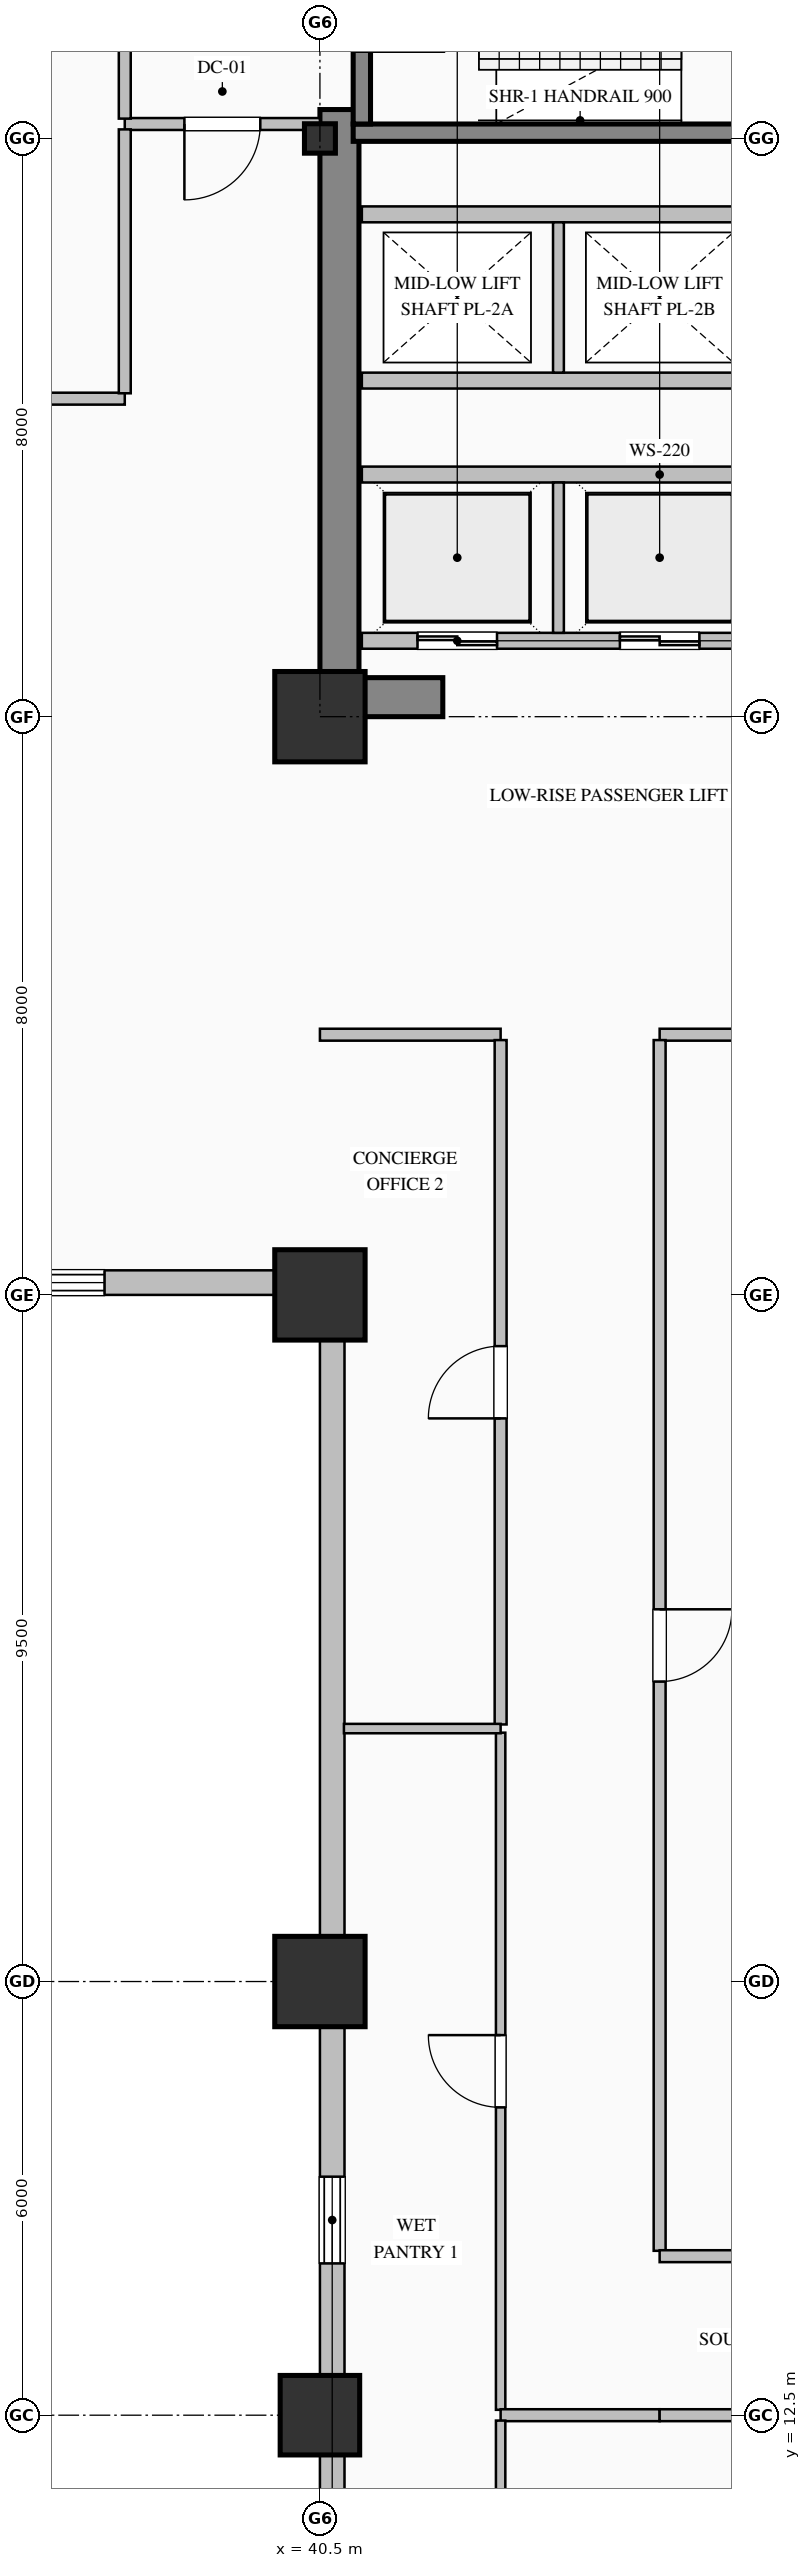
"""IFC4 building model, lengths in metres.
Left out: names, types, materials, properties, quantities, classifications, styles, units other than length and angle.
Written with IfcOpenShell. Run it as: python <this file> out.ifc"""

import sys

from ifc_helpers import new_model, si_unit, direction, frame, frame_2d, origin, origin_2d, place, context, subcontext, project, spatial, rectangle, hollow_rectangle, i_section, extrude, element, fill, save


model = new_model("IFC4")
c1 = context("Model", 3, precision=1e-05, world=origin(), true_north=direction((0.0, 1.0)))
c2 = subcontext(c1, "Body", "Model", "MODEL_VIEW")
j1 = project(units=[si_unit("LENGTHUNIT", "METRE"), si_unit("PLANEANGLEUNIT", "RADIAN")], contexts=[c1])
p1 = place(None, origin())
s1 = spatial("IfcSite", under=j1, at=p1, CompositionType="ELEMENT")
p2 = place(p1, origin())
s2 = spatial("IfcBuilding", under=s1, at=p2, CompositionType="ELEMENT")
p3 = place(p2, frame((0.0, 0.0, 72.2)))
s3 = spatial("IfcBuildingStorey", under=s2, at=p3, CompositionType="ELEMENT", Elevation=72.2)
p4 = place(p3, frame((40.77, 36.54, 0.0), z_axis=(0.0, 0.0, 1.0), x_axis=(0.0, 1.0, 0.0)))
e1 = element("IfcWall", 1, at=p4, inside=s3, PredefinedType="SHEAR", context=c2, shape_type="SweptSolid", body=[
    extrude(rectangle(XDim=7.86, YDim=0.54, at=frame_2d((3.93, 0.0))), origin(), (0.0, 0.0, 1.0), 3.75),
])
p5 = place(p3, frame((40.5, 36.27, 0.0), z_axis=(0.0, 0.0, 1.0), x_axis=(1.0, 0.0, 0.0)))
e2 = element("IfcWall", 2, at=p5, inside=s3, PredefinedType="SHEAR", context=c2, shape_type="SweptSolid", body=[
    extrude(rectangle(XDim=1.7, YDim=0.54, at=frame_2d((0.85, 0.0))), origin(), (0.0, 0.0, 1.0), 3.75),
])
p6 = place(p3, frame((40.5, 12.5, 0.0), z_axis=(0.0, 0.0, 1.0), x_axis=(1.0, 0.0, 0.0)))
e3 = element("IfcColumn", 3, at=p6, inside=s3, PredefinedType="COLUMN", context=c2, shape_type="SweptSolid", body=[
    extrude(hollow_rectangle(XDim=1.1, YDim=1.1, WallThickness=0.04, at=origin_2d()), origin(), (0.0, 0.0, 1.0), 4.0),
])
for number, where, z_axis, x_axis in (
    (4, (40.5, 18.5, 0.0), (0.0, 0.0, 1.0), (1.0, 0.0, 0.0)),
    (5, (40.5, 28.0, 0.0), (0.0, 0.0, 1.0), (1.0, 0.0, 0.0)),
    (6, (40.5, 36.0, 0.0), (0.0, 0.0, 1.0), (1.0, 0.0, 0.0)),
):
    element("IfcColumn", number, at=place(p3, frame(where, z_axis=z_axis, x_axis=x_axis)), inside=s3, PredefinedType="COLUMN", context=c2, shape_type="SweptSolid", body=[
        extrude(hollow_rectangle(XDim=1.25, YDim=1.25, WallThickness=0.045, at=origin_2d()), origin(), (0.0, 0.0, 1.0), 4.0),
    ])
p7 = place(p3, frame((40.5, 44.0, 0.0), z_axis=(0.0, 0.0, 1.0), x_axis=(1.0, 0.0, 0.0)))
e7 = element("IfcColumn", 7, at=p7, inside=s3, PredefinedType="COLUMN", context=c2, shape_type="SweptSolid", body=[
    extrude(i_section(OverallWidth=0.407, OverallDepth=0.428, WebThickness=0.02, FlangeThickness=0.035, FilletRadius=0.022, at=origin_2d()), origin(), (0.0, 0.0, 1.0), 4.0),
])
p8 = place(p3, frame((40.67, 8.0, 0.0), z_axis=(0.0, 0.0, 1.0), x_axis=(0.0, 1.0, 0.0)))
e8 = element("IfcWall", 8, at=p8, inside=s3, PredefinedType="SOLIDWALL", context=c2, shape_type="SweptSolid", body=[
    extrude(rectangle(XDim=20.34, YDim=0.34, at=frame_2d((10.17, 0.0))), origin(), (0.0, 0.0, 1.0), 3.05),
])
p9 = place(p8, frame((6.6, 0.0, 0.7)))
e9 = element("IfcOpeningElement", 9, at=p9, cuts=e8, PredefinedType="OPENING", context=c2, shape_type="SweptSolid", body=[
    extrude(rectangle(XDim=1.2, YDim=1.85, at=frame_2d((0.6, 0.925))), frame((0.0, 0.18, 0.0), z_axis=(0.0, -1.0, 0.0), x_axis=(1.0, 0.0, 0.0)), (0.0, 0.0, 1.0), 0.36),
])
p10 = place(p3, frame((40.52, 28.17, 0.0), z_axis=(0.0, 0.0, 1.0), x_axis=(-1.0, 0.0, 0.0)))
e10 = element("IfcWall", 10, at=p10, inside=s3, PredefinedType="SOLIDWALL", context=c2, shape_type="SweptSolid", body=[
    extrude(rectangle(XDim=36.52, YDim=0.34, at=frame_2d((18.26, 0.0))), origin(), (0.0, 0.0, 1.0), 3.05),
])
p11 = place(p10, frame((3.0, 0.0, 0.7)))
e11 = element("IfcOpeningElement", 11, at=p11, cuts=e10, PredefinedType="OPENING", context=c2, shape_type="SweptSolid", body=[
    extrude(rectangle(XDim=1.2, YDim=1.85, at=frame_2d((0.6, 0.925))), frame((0.0, 0.18, 0.0), z_axis=(0.0, -1.0, 0.0), x_axis=(1.0, 0.0, 0.0)), (0.0, 0.0, 1.0), 0.36),
])
p12 = place(p10, frame((10.2, 0.0, 0.7)))
e12 = element("IfcOpeningElement", 12, at=p12, cuts=e10, PredefinedType="OPENING", context=c2, shape_type="SweptSolid", body=[
    extrude(rectangle(XDim=1.2, YDim=1.85, at=frame_2d((0.6, 0.925))), frame((0.0, 0.18, 0.0), z_axis=(0.0, -1.0, 0.0), x_axis=(1.0, 0.0, 0.0)), (0.0, 0.0, 1.0), 0.36),
])
p13 = place(p10, frame((13.8, 0.0, 0.7)))
e13 = element("IfcOpeningElement", 13, at=p13, cuts=e10, PredefinedType="OPENING", context=c2, shape_type="SweptSolid", body=[
    extrude(rectangle(XDim=1.2, YDim=1.85, at=frame_2d((0.6, 0.925))), frame((0.0, 0.18, 0.0), z_axis=(0.0, -1.0, 0.0), x_axis=(1.0, 0.0, 0.0)), (0.0, 0.0, 1.0), 0.36),
])
p14 = place(p10, frame((17.4, 0.0, 0.7)))
e14 = element("IfcOpeningElement", 14, at=p14, cuts=e10, PredefinedType="OPENING", context=c2, shape_type="SweptSolid", body=[
    extrude(rectangle(XDim=1.2, YDim=1.85, at=frame_2d((0.6, 0.925))), frame((0.0, 0.18, 0.0), z_axis=(0.0, -1.0, 0.0), x_axis=(1.0, 0.0, 0.0)), (0.0, 0.0, 1.0), 0.36),
])
p15 = place(p10, frame((21.0, 0.0, 0.7)))
e15 = element("IfcOpeningElement", 15, at=p15, cuts=e10, PredefinedType="OPENING", context=c2, shape_type="SweptSolid", body=[
    extrude(rectangle(XDim=1.2, YDim=1.85, at=frame_2d((0.6, 0.925))), frame((0.0, 0.18, 0.0), z_axis=(0.0, -1.0, 0.0), x_axis=(1.0, 0.0, 0.0)), (0.0, 0.0, 1.0), 0.36),
])
p16 = place(p10, frame((28.2, 0.0, 0.7)))
e16 = element("IfcOpeningElement", 16, at=p16, cuts=e10, PredefinedType="OPENING", context=c2, shape_type="SweptSolid", body=[
    extrude(rectangle(XDim=1.2, YDim=1.85, at=frame_2d((0.6, 0.925))), frame((0.0, 0.18, 0.0), z_axis=(0.0, -1.0, 0.0), x_axis=(1.0, 0.0, 0.0)), (0.0, 0.0, 1.0), 0.36),
])
p17 = place(p3, frame((49.04, 44.08, 0.0), z_axis=(0.0, 0.0, 1.0), x_axis=(-1.0, 0.0, 0.0)))
e17 = element("IfcWall", 17, at=p17, inside=s3, PredefinedType="SOLIDWALL", context=c2, shape_type="SweptSolid", body=[
    extrude(rectangle(XDim=8.08, YDim=0.24, at=frame_2d((4.04, 0.0))), origin(), (0.0, 0.0, 1.0), 4.0),
])
p18 = place(p3, frame((41.08, 47.35, 0.0), z_axis=(0.0, 0.0, 1.0), x_axis=(0.0, -1.0, 0.0)))
e18 = element("IfcWall", 18, at=p18, inside=s3, PredefinedType="SOLIDWALL", context=c2, shape_type="SweptSolid", body=[
    extrude(rectangle(XDim=3.15, YDim=0.24, at=frame_2d((1.575, 0.0))), origin(), (0.0, 0.0, 1.0), 4.0),
])
p19 = place(p18, frame((1.0, 0.0, 0.0)))
e19 = element("IfcOpeningElement", 19, at=p19, cuts=e18, PredefinedType="OPENING", context=c2, shape_type="SweptSolid", body=[
    extrude(rectangle(XDim=1.15, YDim=2.2, at=frame_2d((0.575, 1.1))), frame((0.0, 0.13, 0.0), z_axis=(0.0, -1.0, 0.0), x_axis=(1.0, 0.0, 0.0)), (0.0, 0.0, 1.0), 0.26),
])
p20 = place(p3, frame((49.32, 37.05, 0.0), z_axis=(0.0, 0.0, 1.0), x_axis=(-1.0, 0.0, 0.0)))
e20 = element("IfcWall", 20, at=p20, inside=s3, PredefinedType="PARTITIONING", context=c2, shape_type="SweptSolid", body=[
    extrude(rectangle(XDim=8.24, YDim=0.22, at=frame_2d((4.12, 0.0))), origin(), (0.0, 0.0, 1.0), 3.75),
])
p21 = place(p20, frame((6.37, 0.0, 0.0)))
e21 = element("IfcOpeningElement", 21, at=p21, cuts=e20, PredefinedType="OPENING", context=c2, shape_type="SweptSolid", body=[
    extrude(rectangle(XDim=1.1, YDim=2.2, at=frame_2d((0.55, 1.1))), frame((0.0, 0.12, 0.0), z_axis=(0.0, -1.0, 0.0), x_axis=(1.0, 0.0, 0.0)), (0.0, 0.0, 1.0), 0.24),
])
p22 = place(p20, frame((3.57, 0.0, 0.0)))
e22 = element("IfcOpeningElement", 22, at=p22, cuts=e20, PredefinedType="OPENING", context=c2, shape_type="SweptSolid", body=[
    extrude(rectangle(XDim=1.1, YDim=2.2, at=frame_2d((0.55, 1.1))), frame((0.0, 0.12, 0.0), z_axis=(0.0, -1.0, 0.0), x_axis=(1.0, 0.0, 0.0)), (0.0, 0.0, 1.0), 0.24),
])
p23 = place(p20, frame((0.77, 0.0, 0.0)))
e23 = element("IfcOpeningElement", 23, at=p23, cuts=e20, PredefinedType="OPENING", context=c2, shape_type="SweptSolid", body=[
    extrude(rectangle(XDim=1.1, YDim=2.2, at=frame_2d((0.55, 1.1))), frame((0.0, 0.12, 0.0), z_axis=(0.0, -1.0, 0.0), x_axis=(1.0, 0.0, 0.0)), (0.0, 0.0, 1.0), 0.24),
])
p24 = place(p3, frame((41.08, 39.35, 0.0), z_axis=(0.0, 0.0, 1.0), x_axis=(1.0, 0.0, 0.0)))
e24 = element("IfcWall", 24, at=p24, inside=s3, PredefinedType="PARTITIONING", context=c2, shape_type="SweptSolid", body=[
    extrude(rectangle(XDim=8.24, YDim=0.22, at=frame_2d((4.12, 0.0))), origin(), (0.0, 0.0, 1.0), 3.75),
])
p25 = place(p3, frame((43.8, 37.16, 0.0), z_axis=(0.0, 0.0, 1.0), x_axis=(0.0, 1.0, 0.0)))
e25 = element("IfcWall", 25, at=p25, inside=s3, PredefinedType="PARTITIONING", context=c2, shape_type="SweptSolid", body=[
    extrude(rectangle(XDim=2.08, YDim=0.15, at=frame_2d((1.04, 0.0))), origin(), (0.0, 0.0, 1.0), 3.75),
])
for number, where, z_axis, x_axis in (
    (26, (49.32, 40.65, 0.0), (0.0, 0.0, 1.0), (-1.0, 0.0, 0.0)),
    (27, (41.08, 42.95, 0.0), (0.0, 0.0, 1.0), (1.0, 0.0, 0.0)),
):
    element("IfcWall", number, at=place(p3, frame(where, z_axis=z_axis, x_axis=x_axis)), inside=s3, PredefinedType="PARTITIONING", context=c2, shape_type="SweptSolid", body=[
        extrude(rectangle(XDim=8.24, YDim=0.22, at=frame_2d((4.12, 0.0))), origin(), (0.0, 0.0, 1.0), 3.75),
    ])
p26 = place(p3, frame((43.8, 40.76, 0.0), z_axis=(0.0, 0.0, 1.0), x_axis=(0.0, 1.0, 0.0)))
e28 = element("IfcWall", 28, at=p26, inside=s3, PredefinedType="PARTITIONING", context=c2, shape_type="SweptSolid", body=[
    extrude(rectangle(XDim=2.08, YDim=0.15, at=frame_2d((1.04, 0.0))), origin(), (0.0, 0.0, 1.0), 3.75),
])
p27 = place(p3, frame((40.5, 44.2, 0.0), z_axis=(0.0, 0.0, 1.0), x_axis=(-1.0, 0.0, 0.0)))
e29 = element("IfcWall", 29, at=p27, inside=s3, PredefinedType="PARTITIONING", context=c2, shape_type="SweptSolid", body=[
    extrude(rectangle(XDim=2.7, YDim=0.165, at=frame_2d((1.35, 0.0))), origin(), (0.0, 0.0, 1.0), 3.75),
])
p28 = place(p27, frame((0.825, 0.0, 0.0)))
e30 = element("IfcOpeningElement", 30, at=p28, cuts=e29, PredefinedType="OPENING", context=c2, shape_type="SweptSolid", body=[
    extrude(rectangle(XDim=1.05, YDim=2.15, at=frame_2d((0.525, 1.075))), frame((0.0, 0.093, 0.0), z_axis=(0.0, -1.0, 0.0), x_axis=(1.0, 0.0, 0.0)), (0.0, 0.0, 1.0), 0.185),
])
p29 = place(p3, frame((37.8, 44.274, 0.0), z_axis=(0.0, 0.0, 1.0), x_axis=(0.0, 1.0, 0.0)))
e31 = element("IfcWall", 31, at=p29, inside=s3, PredefinedType="PARTITIONING", context=c2, shape_type="SweptSolid", body=[
    extrude(rectangle(XDim=3.051, YDim=0.165, at=frame_2d((1.525, 0.0))), origin(), (0.0, 0.0, 1.0), 3.75),
])
p30 = place(p3, frame((24.5, 40.4, 0.0), z_axis=(0.0, 0.0, 1.0), x_axis=(1.0, 0.0, 0.0)))
e32 = element("IfcWall", 32, at=p30, inside=s3, PredefinedType="PARTITIONING", context=c2, shape_type="SweptSolid", body=[
    extrude(rectangle(XDim=13.3, YDim=0.165, at=frame_2d((6.65, 0.0))), origin(), (0.0, 0.0, 1.0), 3.75),
])
p31 = place(p30, frame((6.15, 0.0, 0.0)))
e33 = element("IfcOpeningElement", 33, at=p31, cuts=e32, PredefinedType="OPENING", context=c2, shape_type="SweptSolid", body=[
    extrude(rectangle(XDim=1.0, YDim=2.15, at=frame_2d((0.5, 1.075))), frame((0.0, 0.093, 0.0), z_axis=(0.0, -1.0, 0.0), x_axis=(1.0, 0.0, 0.0)), (0.0, 0.0, 1.0), 0.185),
])
p32 = place(p3, frame((37.8, 40.475, 0.0), z_axis=(0.0, 0.0, 1.0), x_axis=(0.0, 1.0, 0.0)))
e34 = element("IfcWall", 34, at=p32, inside=s3, PredefinedType="PARTITIONING", context=c2, shape_type="SweptSolid", body=[
    extrude(rectangle(XDim=3.651, YDim=0.165, at=frame_2d((1.825, 0.0))), origin(), (0.0, 0.0, 1.0), 3.75),
])
p33 = place(p3, frame((51.5, 31.6, 0.0), z_axis=(0.0, 0.0, 1.0), x_axis=(-1.0, 0.0, 0.0)))
e35 = element("IfcWall", 35, at=p33, inside=s3, PredefinedType="PARTITIONING", context=c2, shape_type="SweptSolid", body=[
    extrude(rectangle(XDim=6.3, YDim=0.165, at=frame_2d((3.15, 0.0))), origin(), (0.0, 0.0, 1.0), 3.75),
])
p34 = place(p3, frame((43.0, 31.6, 0.0), z_axis=(0.0, 0.0, 1.0), x_axis=(-1.0, 0.0, 0.0)))
e36 = element("IfcWall", 36, at=p34, inside=s3, PredefinedType="PARTITIONING", context=c2, shape_type="SweptSolid", body=[
    extrude(rectangle(XDim=2.5, YDim=0.165, at=frame_2d((1.25, 0.0))), origin(), (0.0, 0.0, 1.0), 3.75),
])
p35 = place(p3, frame((45.2, 31.525, 0.0), z_axis=(0.0, 0.0, 1.0), x_axis=(0.0, -1.0, 0.0)))
e37 = element("IfcWall", 37, at=p35, inside=s3, PredefinedType="PARTITIONING", context=c2, shape_type="SweptSolid", body=[
    extrude(rectangle(XDim=16.751, YDim=0.165, at=frame_2d((8.375, 0.0))), origin(), (0.0, 0.0, 1.0), 3.75),
])
p36 = place(p35, frame((7.875, 0.0, 0.0)))
e38 = element("IfcOpeningElement", 38, at=p36, cuts=e37, PredefinedType="OPENING", context=c2, shape_type="SweptSolid", body=[
    extrude(rectangle(XDim=1.0, YDim=2.15, at=frame_2d((0.5, 1.075))), frame((0.0, 0.093, 0.0), z_axis=(0.0, -1.0, 0.0), x_axis=(1.0, 0.0, 0.0)), (0.0, 0.0, 1.0), 0.185),
])
p37 = place(p3, frame((43.0, 12.574, 0.0), z_axis=(0.0, 0.0, 1.0), x_axis=(0.0, 1.0, 0.0)))
e39 = element("IfcWall", 39, at=p37, inside=s3, PredefinedType="PARTITIONING", context=c2, shape_type="SweptSolid", body=[
    extrude(rectangle(XDim=9.369, YDim=0.13, at=frame_2d((4.684, 0.0))), origin(), (0.0, 0.0, 1.0), 3.75),
])
p38 = place(p37, frame((4.184, 0.0, 0.0)))
e40 = element("IfcOpeningElement", 40, at=p38, cuts=e39, PredefinedType="OPENING", context=c2, shape_type="SweptSolid", body=[
    extrude(rectangle(XDim=1.0, YDim=2.15, at=frame_2d((0.5, 1.075))), frame((0.0, 0.075, 0.0), z_axis=(0.0, -1.0, 0.0), x_axis=(1.0, 0.0, 0.0)), (0.0, 0.0, 1.0), 0.15),
])
p39 = place(p3, frame((43.0, 22.057, 0.0), z_axis=(0.0, 0.0, 1.0), x_axis=(0.0, 1.0, 0.0)))
e41 = element("IfcWall", 41, at=p39, inside=s3, PredefinedType="PARTITIONING", context=c2, shape_type="SweptSolid", body=[
    extrude(rectangle(XDim=9.469, YDim=0.165, at=frame_2d((4.734, 0.0))), origin(), (0.0, 0.0, 1.0), 3.75),
])
p40 = place(p39, frame((4.234, 0.0, 0.0)))
e42 = element("IfcOpeningElement", 42, at=p40, cuts=e41, PredefinedType="OPENING", context=c2, shape_type="SweptSolid", body=[
    extrude(rectangle(XDim=1.0, YDim=2.15, at=frame_2d((0.5, 1.075))), frame((0.0, 0.093, 0.0), z_axis=(0.0, -1.0, 0.0), x_axis=(1.0, 0.0, 0.0)), (0.0, 0.0, 1.0), 0.185),
])
p41 = place(p3, frame((45.2, 12.5, 0.0), z_axis=(0.0, 0.0, 1.0), x_axis=(-1.0, 0.0, 0.0)))
e43 = element("IfcWall", 43, at=p41, inside=s3, PredefinedType="PARTITIONING", context=c2, shape_type="SweptSolid", body=[
    extrude(rectangle(XDim=2.2, YDim=0.165, at=frame_2d((1.1, 0.0))), origin(), (0.0, 0.0, 1.0), 3.042),
])
p42 = place(p3, frame((45.2, 14.7, 0.0), z_axis=(0.0, 0.0, 1.0), x_axis=(1.0, 0.0, 0.0)))
e44 = element("IfcWall", 44, at=p42, inside=s3, PredefinedType="PARTITIONING", context=c2, shape_type="SweptSolid", body=[
    extrude(rectangle(XDim=6.3, YDim=0.165, at=frame_2d((3.15, 0.0))), origin(), (0.0, 0.0, 1.0), 3.75),
])
p43 = place(p3, frame((53.5, 12.5, 0.0), z_axis=(0.0, 0.0, 1.0), x_axis=(-1.0, 0.0, 0.0)))
e45 = element("IfcWall", 45, at=p43, inside=s3, PredefinedType="PARTITIONING", context=c2, shape_type="SweptSolid", body=[
    extrude(rectangle(XDim=8.3, YDim=0.165, at=frame_2d((4.15, 0.0))), origin(), (0.0, 0.0, 1.0), 3.042),
])
p44 = place(p43, frame((3.65, 0.0, 0.0)))
e46 = element("IfcOpeningElement", 46, at=p44, cuts=e45, PredefinedType="OPENING", context=c2, shape_type="SweptSolid", body=[
    extrude(rectangle(XDim=1.0, YDim=2.15, at=frame_2d((0.5, 1.075))), frame((0.0, 0.093, 0.0), z_axis=(0.0, -1.0, 0.0), x_axis=(1.0, 0.0, 0.0)), (0.0, 0.0, 1.0), 0.185),
])
p45 = place(p3, frame((40.832, 22.0, 0.0), z_axis=(0.0, 0.0, 1.0), x_axis=(1.0, 0.0, 0.0)))
e47 = element("IfcWall", 47, at=p45, inside=s3, PredefinedType="PARTITIONING", context=c2, shape_type="SweptSolid", body=[
    extrude(rectangle(XDim=2.168, YDim=0.13, at=frame_2d((1.084, 0.0))), origin(), (0.0, 0.0, 1.0), 3.75),
])
p46 = place(p3, frame((43.0, 12.426, 0.0), z_axis=(0.0, 0.0, 1.0), x_axis=(0.0, -1.0, 0.0)))
e48 = element("IfcWall", 48, at=p46, inside=s3, PredefinedType="PARTITIONING", context=c2, shape_type="SweptSolid", body=[
    extrude(rectangle(XDim=6.456, YDim=0.13, at=frame_2d((3.228, 0.0))), origin(), (0.0, 0.0, 1.0), 3.75),
])
p47 = place(p9, origin())
e49 = element("IfcWindow", 49, at=p47, inside=s3, PartitioningType="DOUBLE_PANEL_VERTICAL", PredefinedType="WINDOW", context=c2, shape_type="SweptSolid", body=[
    extrude(rectangle(XDim=1.2, YDim=1.85, at=frame_2d((0.6, 0.925))), frame((0.0, 0.15, 0.0), z_axis=(0.0, -1.0, 0.0), x_axis=(1.0, 0.0, 0.0)), (0.0, 0.0, 1.0), 0.06),
])
fill(e9, e49)
p48 = place(p11, origin())
e50 = element("IfcWindow", 50, at=p48, inside=s3, PartitioningType="DOUBLE_PANEL_VERTICAL", PredefinedType="WINDOW", context=c2, shape_type="SweptSolid", body=[
    extrude(rectangle(XDim=1.2, YDim=1.85, at=frame_2d((0.6, 0.925))), frame((0.0, 0.15, 0.0), z_axis=(0.0, -1.0, 0.0), x_axis=(1.0, 0.0, 0.0)), (0.0, 0.0, 1.0), 0.06),
])
fill(e11, e50)
p49 = place(p21, origin())
e51 = element("IfcDoor", 51, at=p49, inside=s3, OperationType="DOUBLE_DOOR_SLIDING", PredefinedType="DOOR", context=c2, shape_type="SweptSolid", body=[
    extrude(rectangle(XDim=1.1, YDim=2.2, at=frame_2d((0.55, 1.1))), frame((0.0, 0.025, 0.0), z_axis=(0.0, -1.0, 0.0), x_axis=(1.0, 0.0, 0.0)), (0.0, 0.0, 1.0), 0.05),
])
fill(e21, e51)
p50 = place(p22, origin())
e52 = element("IfcDoor", 52, at=p50, inside=s3, OperationType="DOUBLE_DOOR_SLIDING", PredefinedType="DOOR", context=c2, shape_type="SweptSolid", body=[
    extrude(rectangle(XDim=1.1, YDim=2.2, at=frame_2d((0.55, 1.1))), frame((0.0, 0.025, 0.0), z_axis=(0.0, -1.0, 0.0), x_axis=(1.0, 0.0, 0.0)), (0.0, 0.0, 1.0), 0.05),
])
fill(e22, e52)
p51 = place(p28, origin())
e53 = element("IfcDoor", 53, at=p51, inside=s3, OperationType="SINGLE_SWING_RIGHT", PredefinedType="DOOR", context=c2, shape_type="SweptSolid", body=[
    extrude(rectangle(XDim=1.05, YDim=2.15, at=frame_2d((0.525, 1.075))), frame((0.0, 0.025, 0.0), z_axis=(0.0, -1.0, 0.0), x_axis=(1.0, 0.0, 0.0)), (0.0, 0.0, 1.0), 0.05),
])
fill(e30, e53)
p52 = place(p36, origin())
e54 = element("IfcDoor", 54, at=p52, inside=s3, OperationType="SINGLE_SWING_LEFT", PredefinedType="DOOR", context=c2, shape_type="SweptSolid", body=[
    extrude(rectangle(XDim=1.0, YDim=2.15, at=frame_2d((0.5, 1.075))), frame((0.0, 0.025, 0.0), z_axis=(0.0, -1.0, 0.0), x_axis=(1.0, 0.0, 0.0)), (0.0, 0.0, 1.0), 0.05),
])
fill(e38, e54)
p53 = place(p38, origin())
e55 = element("IfcDoor", 55, at=p53, inside=s3, OperationType="SINGLE_SWING_RIGHT", PredefinedType="DOOR", context=c2, shape_type="SweptSolid", body=[
    extrude(rectangle(XDim=1.0, YDim=2.15, at=frame_2d((0.5, 1.075))), frame((0.0, 0.025, 0.0), z_axis=(0.0, -1.0, 0.0), x_axis=(1.0, 0.0, 0.0)), (0.0, 0.0, 1.0), 0.05),
])
fill(e40, e55)
p54 = place(p40, origin())
e56 = element("IfcDoor", 56, at=p54, inside=s3, OperationType="SINGLE_SWING_LEFT", PredefinedType="DOOR", context=c2, shape_type="SweptSolid", body=[
    extrude(rectangle(XDim=1.0, YDim=2.15, at=frame_2d((0.5, 1.075))), frame((0.0, 0.025, 0.0), z_axis=(0.0, -1.0, 0.0), x_axis=(1.0, 0.0, 0.0)), (0.0, 0.0, 1.0), 0.05),
])
fill(e42, e56)
save(model, sys.argv[1])
